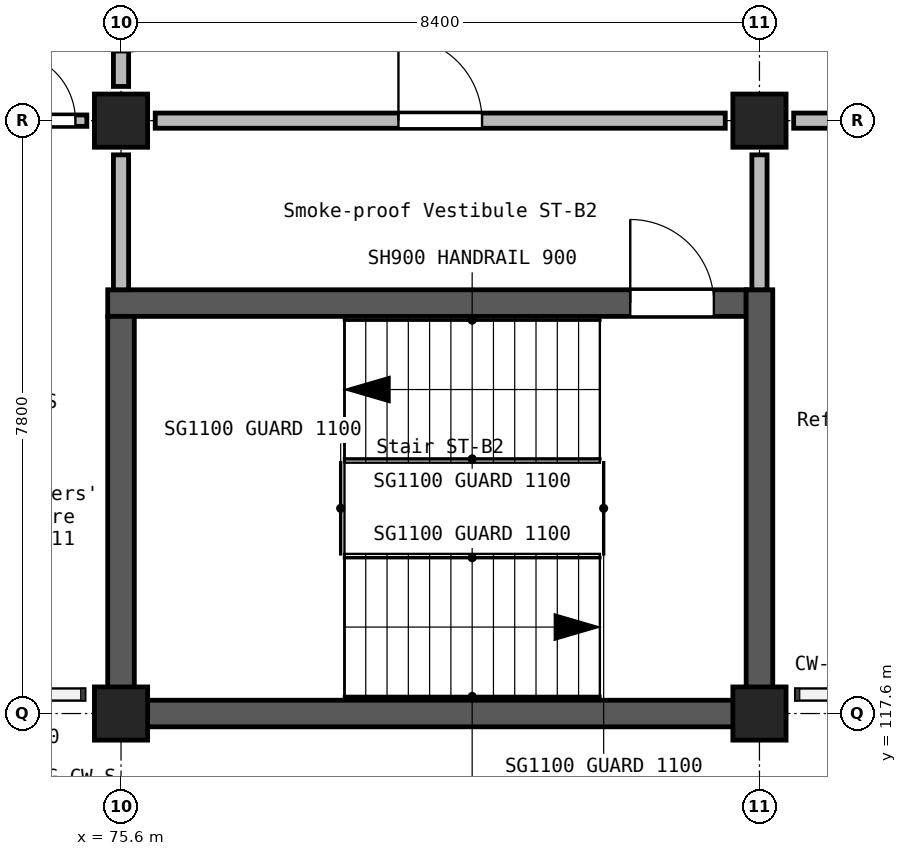
"""IFC4 building model, lengths in metres.
Left out: names, types, materials, properties, quantities, classifications, styles, units other than length and angle.
Written with IfcOpenShell. Run it as: python <this file> out.ifc"""

import sys

from ifc_helpers import new_model, si_unit, direction, frame, frame_2d, origin, origin_2d, place, context, subcontext, project, spatial, rectangle, extrude, element, fill, save


model = new_model("IFC4")
c1 = context("Model", 3, precision=1e-05, world=origin(), true_north=direction((0.0, 1.0)))
c2 = subcontext(c1, "Body", "Model", "MODEL_VIEW")
j1 = project(units=[si_unit("LENGTHUNIT", "METRE"), si_unit("PLANEANGLEUNIT", "RADIAN")], contexts=[c1])
p1 = place(None, origin())
s1 = spatial("IfcSite", under=j1, at=p1, CompositionType="ELEMENT")
p2 = place(p1, origin())
s2 = spatial("IfcBuilding", under=s1, at=p2, CompositionType="ELEMENT")
p3 = place(p2, frame((0.0, 0.0, 24.9)))
s3 = spatial("IfcBuildingStorey", under=s2, at=p3, CompositionType="ELEMENT", Elevation=24.9)
for number, where, z_axis, x_axis in (
    (1, (75.6, 117.6, 0.0), (0.0, 0.0, 1.0), (1.0, 0.0, 0.0)),
    (2, (75.6, 125.4, 0.0), (0.0, 0.0, 1.0), (1.0, 0.0, 0.0)),
    (3, (84.0, 117.6, 0.0), (0.0, 0.0, 1.0), (1.0, 0.0, 0.0)),
    (4, (84.0, 125.4, 0.0), (0.0, 0.0, 1.0), (1.0, 0.0, 0.0)),
):
    element("IfcColumn", number, at=place(p3, frame(where, z_axis=z_axis, x_axis=x_axis)), inside=s3, PredefinedType="COLUMN", context=c2, shape_type="SweptSolid", body=[
        extrude(rectangle(XDim=0.7, YDim=0.7, at=origin_2d()), origin(), (0.0, 0.0, 1.0), 3.9),
    ])
p4 = place(p3, frame((75.425, 123.0, 0.0), z_axis=(0.0, 0.0, 1.0), x_axis=(1.0, 0.0, 0.0)))
e5 = element("IfcWall", 5, at=p4, inside=s3, PredefinedType="SHEAR", context=c2, shape_type="SweptSolid", body=[
    extrude(rectangle(XDim=8.4, YDim=0.35, at=frame_2d((4.2, 0.0))), origin(), (0.0, 0.0, 1.0), 3.9),
])
p5 = place(p4, frame((6.875, 0.0, 0.0)))
e6 = element("IfcOpeningElement", 6, at=p5, cuts=e5, PredefinedType="OPENING", context=c2, shape_type="SweptSolid", body=[
    extrude(rectangle(XDim=1.1, YDim=2.1, at=frame_2d((0.55, 1.05))), frame((0.0, 0.185, 0.0), z_axis=(0.0, -1.0, 0.0), x_axis=(1.0, 0.0, 0.0)), (0.0, 0.0, 1.0), 0.37),
])
p6 = place(p3, frame((75.6, 117.425, 0.0), z_axis=(0.0, 0.0, 1.0), x_axis=(0.0, 1.0, 0.0)))
e7 = element("IfcWall", 7, at=p6, inside=s3, PredefinedType="SHEAR", context=c2, shape_type="SweptSolid", body=[
    extrude(rectangle(XDim=5.4, YDim=0.35, at=frame_2d((2.7, 0.0))), origin(), (0.0, 0.0, 1.0), 3.9),
])
p7 = place(p3, frame((75.775, 117.6, 0.0), z_axis=(0.0, 0.0, 1.0), x_axis=(1.0, 0.0, 0.0)))
e8 = element("IfcWall", 8, at=p7, inside=s3, PredefinedType="SHEAR", context=c2, shape_type="SweptSolid", body=[
    extrude(rectangle(XDim=8.05, YDim=0.35, at=frame_2d((4.025, 0.0))), origin(), (0.0, 0.0, 1.0), 3.9),
])
p8 = place(p3, frame((84.0, 117.425, 0.0), z_axis=(0.0, 0.0, 1.0), x_axis=(0.0, 1.0, 0.0)))
e9 = element("IfcWall", 9, at=p8, inside=s3, PredefinedType="SHEAR", context=c2, shape_type="SweptSolid", body=[
    extrude(rectangle(XDim=5.75, YDim=0.35, at=frame_2d((2.875, 0.0))), origin(), (0.0, 0.0, 1.0), 3.9),
])
p9 = place(p3, frame((75.6, 128.55, 0.0), z_axis=(0.0, 0.0, 1.0), x_axis=(0.0, -1.0, 0.0)))
e10 = element("IfcWall", 10, at=p9, inside=s3, PredefinedType="SOLIDWALL", context=c2, shape_type="SweptSolid", body=[
    extrude(rectangle(XDim=2.7, YDim=0.2, at=frame_2d((1.35, 0.0))), origin(), (0.0, 0.0, 1.0), 3.6),
])
p10 = place(p9, frame((0.45, 0.0, 0.0)))
e11 = element("IfcOpeningElement", 11, at=p10, cuts=e10, PredefinedType="OPENING", context=c2, shape_type="SweptSolid", body=[
    extrude(rectangle(XDim=1.8, YDim=2.1, at=frame_2d((0.9, 1.05))), frame((0.0, 0.11, 0.0), z_axis=(0.0, -1.0, 0.0), x_axis=(1.0, 0.0, 0.0)), (0.0, 0.0, 1.0), 0.22),
])
p11 = place(p3, frame((75.6, 124.95, 0.0), z_axis=(0.0, 0.0, 1.0), x_axis=(0.0, -1.0, 0.0)))
e12 = element("IfcWall", 12, at=p11, inside=s3, PredefinedType="SOLIDWALL", context=c2, shape_type="SweptSolid", body=[
    extrude(rectangle(XDim=1.775, YDim=0.2, at=frame_2d((0.887, 0.0))), origin(), (0.0, 0.0, 1.0), 3.6),
])
p12 = place(p3, frame((76.05, 125.4, 0.0), z_axis=(0.0, 0.0, 1.0), x_axis=(1.0, 0.0, 0.0)))
e13 = element("IfcWall", 13, at=p12, inside=s3, PredefinedType="SOLIDWALL", context=c2, shape_type="SweptSolid", body=[
    extrude(rectangle(XDim=7.5, YDim=0.2, at=frame_2d((3.75, 0.0))), origin(), (0.0, 0.0, 1.0), 3.6),
])
p13 = place(p12, frame((3.2, 0.0, 0.0)))
e14 = element("IfcOpeningElement", 14, at=p13, cuts=e13, PredefinedType="OPENING", context=c2, shape_type="SweptSolid", body=[
    extrude(rectangle(XDim=1.1, YDim=2.1, at=frame_2d((0.55, 1.05))), frame((0.0, 0.11, 0.0), z_axis=(0.0, -1.0, 0.0), x_axis=(1.0, 0.0, 0.0)), (0.0, 0.0, 1.0), 0.22),
])
p14 = place(p3, frame((84.45, 125.4, 0.0), z_axis=(0.0, 0.0, 1.0), x_axis=(1.0, 0.0, 0.0)))
e15 = element("IfcWall", 15, at=p14, inside=s3, PredefinedType="SOLIDWALL", context=c2, shape_type="SweptSolid", body=[
    extrude(rectangle(XDim=3.85, YDim=0.2, at=frame_2d((1.925, 0.0))), origin(), (0.0, 0.0, 1.0), 3.6),
])
p15 = place(p14, frame((1.15, 0.0, 0.0)))
e16 = element("IfcOpeningElement", 16, at=p15, cuts=e15, PredefinedType="OPENING", context=c2, shape_type="SweptSolid", body=[
    extrude(rectangle(XDim=1.0, YDim=2.1, at=frame_2d((0.5, 1.05))), frame((0.0, 0.11, 0.0), z_axis=(0.0, -1.0, 0.0), x_axis=(1.0, 0.0, 0.0)), (0.0, 0.0, 1.0), 0.22),
])
p16 = place(p3, frame((84.0, 123.175, 0.0), z_axis=(0.0, 0.0, 1.0), x_axis=(0.0, 1.0, 0.0)))
e17 = element("IfcWall", 17, at=p16, inside=s3, PredefinedType="SOLIDWALL", context=c2, shape_type="SweptSolid", body=[
    extrude(rectangle(XDim=1.775, YDim=0.2, at=frame_2d((0.887, 0.0))), origin(), (0.0, 0.0, 1.0), 3.6),
])
p17 = place(p3, frame((73.575, 125.4, 0.0), z_axis=(0.0, 0.0, 1.0), x_axis=(1.0, 0.0, 0.0)))
e18 = element("IfcWall", 18, at=p17, inside=s3, PredefinedType="PARTITIONING", context=c2, shape_type="SweptSolid", body=[
    extrude(rectangle(XDim=1.575, YDim=0.15, at=frame_2d((0.788, 0.0))), origin(), (0.0, 0.0, 1.0), 3.6),
])
p18 = place(p17, frame((0.525, 0.0, 0.0)))
e19 = element("IfcOpeningElement", 19, at=p18, cuts=e18, PredefinedType="OPENING", context=c2, shape_type="SweptSolid", body=[
    extrude(rectangle(XDim=0.9, YDim=2.1, at=frame_2d((0.45, 1.05))), frame((0.0, 0.085, 0.0), z_axis=(0.0, -1.0, 0.0), x_axis=(1.0, 0.0, 0.0)), (0.0, 0.0, 1.0), 0.17),
])
p19 = place(p18, frame((0.9, 0.0, 0.0), z_axis=(0.0, 0.0, 1.0), x_axis=(-1.0, 0.0, 0.0)))
e20 = element("IfcDoor", 20, at=p19, inside=s3, OperationType="SINGLE_SWING_LEFT", PredefinedType="DOOR", context=c2, shape_type="SweptSolid", body=[
    extrude(rectangle(XDim=0.9, YDim=2.1, at=frame_2d((0.45, 1.05))), frame((0.0, 0.025, 0.0), z_axis=(0.0, -1.0, 0.0), x_axis=(1.0, 0.0, 0.0)), (0.0, 0.0, 1.0), 0.05),
])
fill(e19, e20)
p20 = place(p5, frame((1.1, 0.0, 0.0), z_axis=(0.0, 0.0, 1.0), x_axis=(-1.0, 0.0, 0.0)))
e21 = element("IfcDoor", 21, at=p20, inside=s3, OperationType="SINGLE_SWING_LEFT", PredefinedType="DOOR", context=c2, shape_type="SweptSolid", body=[
    extrude(rectangle(XDim=1.1, YDim=2.1, at=frame_2d((0.55, 1.05))), frame((0.0, 0.025, 0.0), z_axis=(0.0, -1.0, 0.0), x_axis=(1.0, 0.0, 0.0)), (0.0, 0.0, 1.0), 0.05),
])
fill(e6, e21)
p21 = place(p13, frame((1.1, 0.0, 0.0), z_axis=(0.0, 0.0, 1.0), x_axis=(-1.0, 0.0, 0.0)))
e22 = element("IfcDoor", 22, at=p21, inside=s3, OperationType="SINGLE_SWING_LEFT", PredefinedType="DOOR", context=c2, shape_type="SweptSolid", body=[
    extrude(rectangle(XDim=1.1, YDim=2.1, at=frame_2d((0.55, 1.05))), frame((0.0, 0.025, 0.0), z_axis=(0.0, -1.0, 0.0), x_axis=(1.0, 0.0, 0.0)), (0.0, 0.0, 1.0), 0.05),
])
fill(e14, e22)
save(model, sys.argv[1])
